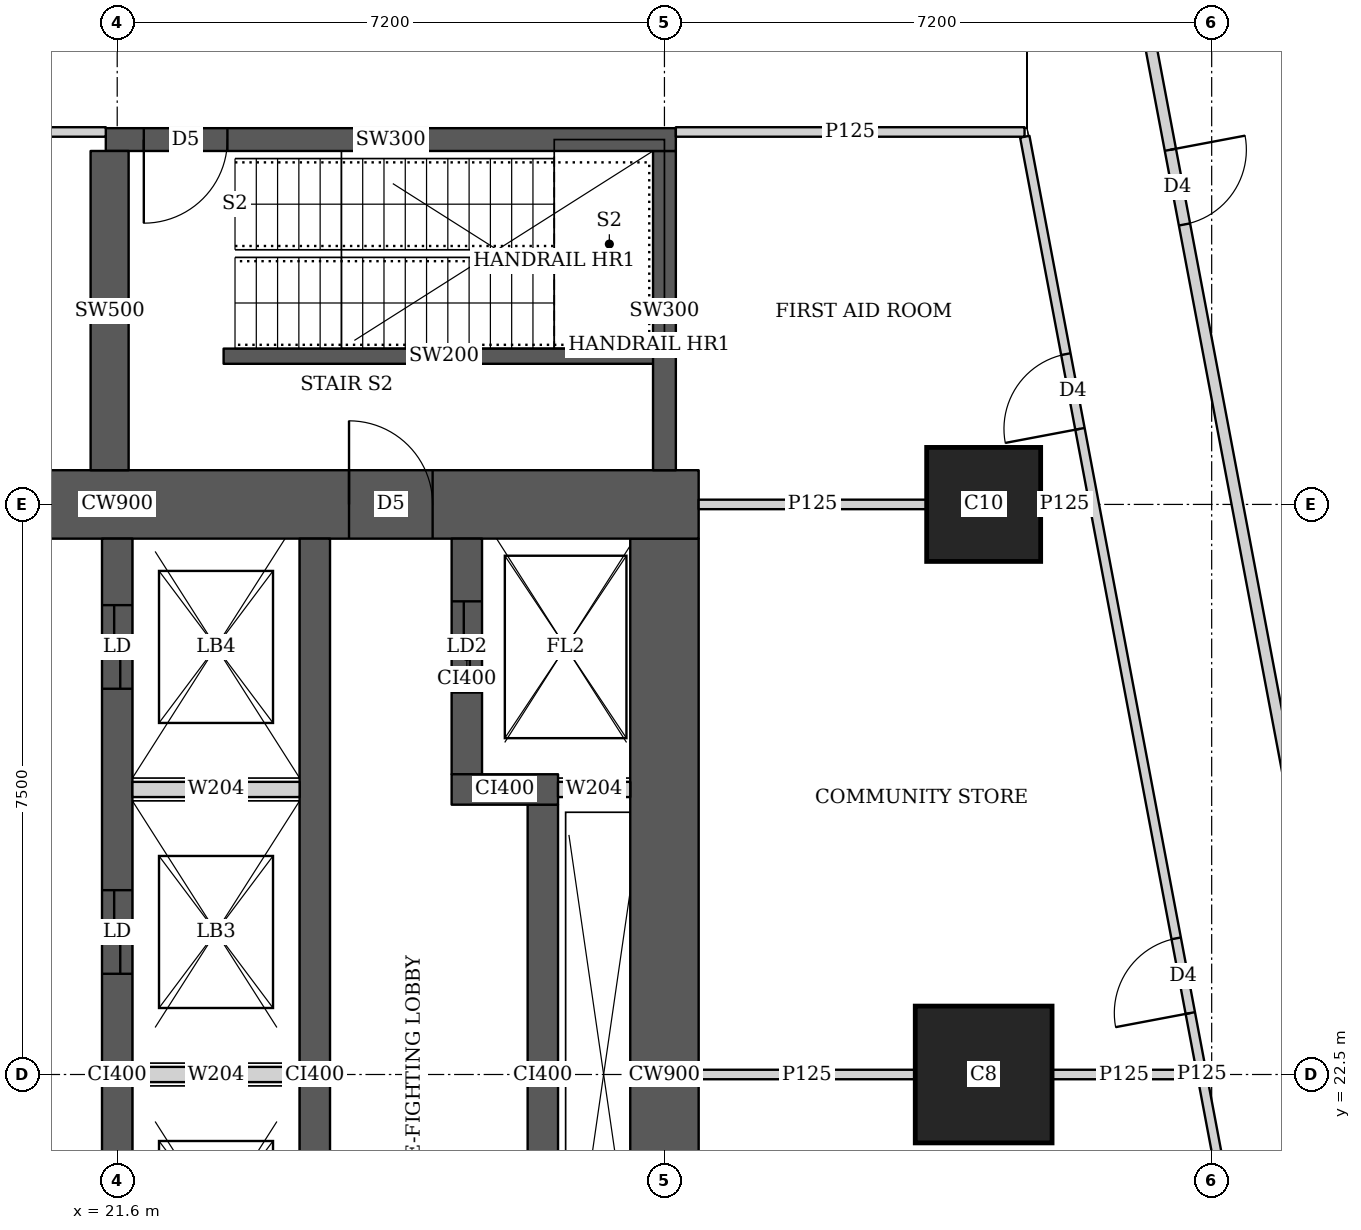
"""IFC4 building model, lengths in metres.
Left out: names, types, materials, properties, quantities, classifications, styles, units other than length and angle.
Written with IfcOpenShell. Run it as: python <this file> out.ifc"""

import sys

from ifc_helpers import new_model, si_unit, direction, frame, frame_2d, origin, origin_2d, place, context, subcontext, project, spatial, rectangle, extrude, element, fill, save


model = new_model("IFC4")
c1 = context("Model", 3, precision=1e-05, world=origin(), true_north=direction((0.0, 1.0)))
c2 = subcontext(c1, "Body", "Model", "MODEL_VIEW")
j1 = project(units=[si_unit("LENGTHUNIT", "METRE"), si_unit("PLANEANGLEUNIT", "RADIAN")], contexts=[c1])
p1 = place(None, origin())
s1 = spatial("IfcSite", under=j1, at=p1, CompositionType="ELEMENT")
p2 = place(p1, origin())
s2 = spatial("IfcBuilding", under=s1, at=p2, CompositionType="ELEMENT")
p3 = place(p2, frame((0.0, 0.0, 188.3)))
s3 = spatial("IfcBuildingStorey", under=s2, at=p3, CompositionType="ELEMENT", Elevation=188.3)
p4 = place(p3, frame((33.0, 22.5, 0.0), z_axis=(0.0, 0.0, 1.0), x_axis=(1.0, 0.0, 0.0)))
e1 = element("IfcColumn", 1, at=p4, inside=s3, PredefinedType="COLUMN", context=c2, shape_type="SweptSolid", body=[
    extrude(rectangle(XDim=1.8, YDim=1.8, at=origin_2d()), origin(), (0.0, 0.0, 1.0), 5.4),
])
p5 = place(p3, frame((33.0, 30.0, 0.0), z_axis=(0.0, 0.0, 1.0), x_axis=(1.0, 0.0, 0.0)))
e2 = element("IfcColumn", 2, at=p5, inside=s3, PredefinedType="COLUMN", context=c2, shape_type="SweptSolid", body=[
    extrude(rectangle(XDim=1.5, YDim=1.5, at=origin_2d()), origin(), (0.0, 0.0, 1.0), 5.4),
])
p6 = place(p3, frame((13.95, 30.0, 0.0), z_axis=(0.0, 0.0, 1.0), x_axis=(1.0, 0.0, 0.0)))
e3 = element("IfcWall", 3, at=p6, inside=s3, PredefinedType="SHEAR", context=c2, shape_type="SweptSolid", body=[
    extrude(rectangle(XDim=15.3, YDim=0.9, at=frame_2d((7.65, 0.0))), origin(), (0.0, 0.0, 1.0), 5.4),
])
p7 = place(p6, frame((4.45, 0.0, 0.0)))
e4 = element("IfcOpeningElement", 4, at=p7, cuts=e3, PredefinedType="OPENING", context=c2, shape_type="SweptSolid", body=[
    extrude(rectangle(XDim=1.8, YDim=2.1, at=frame_2d((0.9, 1.05))), frame((0.0, 0.46, 0.0), z_axis=(0.0, -1.0, 0.0), x_axis=(1.0, 0.0, 0.0)), (0.0, 0.0, 1.0), 0.92),
])
p8 = place(p6, frame((10.7, 0.0, 0.0)))
e5 = element("IfcOpeningElement", 5, at=p8, cuts=e3, PredefinedType="OPENING", context=c2, shape_type="SweptSolid", body=[
    extrude(rectangle(XDim=1.1, YDim=2.1, at=frame_2d((0.55, 1.05))), frame((0.0, 0.46, 0.0), z_axis=(0.0, -1.0, 0.0), x_axis=(1.0, 0.0, 0.0)), (0.0, 0.0, 1.0), 0.92),
])
p9 = place(p3, frame((28.8, 15.45, 0.0), z_axis=(0.0, 0.0, 1.0), x_axis=(0.0, 1.0, 0.0)))
e6 = element("IfcWall", 6, at=p9, inside=s3, PredefinedType="SHEAR", context=c2, shape_type="SweptSolid", body=[
    extrude(rectangle(XDim=14.1, YDim=0.9, at=frame_2d((7.05, 0.0))), origin(), (0.0, 0.0, 1.0), 5.4),
])
p10 = place(p3, frame((21.6, 15.45, 0.0), z_axis=(0.0, 0.0, 1.0), x_axis=(0.0, 1.0, 0.0)))
e7 = element("IfcWall", 7, at=p10, inside=s3, PredefinedType="SHEAR", context=c2, shape_type="SweptSolid", body=[
    extrude(rectangle(XDim=14.1, YDim=0.4, at=frame_2d((7.05, 0.0))), origin(), (0.0, 0.0, 1.0), 5.4),
])
p11 = place(p10, frame((0.875, 0.0, 0.0)))
e8 = element("IfcOpeningElement", 8, at=p11, cuts=e7, PredefinedType="OPENING", context=c2, shape_type="SweptSolid", body=[
    extrude(rectangle(XDim=1.1, YDim=2.1, at=frame_2d((0.55, 1.05))), frame((0.0, 0.21, 0.0), z_axis=(0.0, -1.0, 0.0), x_axis=(1.0, 0.0, 0.0)), (0.0, 0.0, 1.0), 0.42),
])
p12 = place(p10, frame((4.625, 0.0, 0.0)))
e9 = element("IfcOpeningElement", 9, at=p12, cuts=e7, PredefinedType="OPENING", context=c2, shape_type="SweptSolid", body=[
    extrude(rectangle(XDim=1.1, YDim=2.1, at=frame_2d((0.55, 1.05))), frame((0.0, 0.21, 0.0), z_axis=(0.0, -1.0, 0.0), x_axis=(1.0, 0.0, 0.0)), (0.0, 0.0, 1.0), 0.42),
])
p13 = place(p10, frame((8.375, 0.0, 0.0)))
e10 = element("IfcOpeningElement", 10, at=p13, cuts=e7, PredefinedType="OPENING", context=c2, shape_type="SweptSolid", body=[
    extrude(rectangle(XDim=1.1, YDim=2.1, at=frame_2d((0.55, 1.05))), frame((0.0, 0.21, 0.0), z_axis=(0.0, -1.0, 0.0), x_axis=(1.0, 0.0, 0.0)), (0.0, 0.0, 1.0), 0.42),
])
p14 = place(p10, frame((12.125, 0.0, 0.0)))
e11 = element("IfcOpeningElement", 11, at=p14, cuts=e7, PredefinedType="OPENING", context=c2, shape_type="SweptSolid", body=[
    extrude(rectangle(XDim=1.1, YDim=2.1, at=frame_2d((0.55, 1.05))), frame((0.0, 0.21, 0.0), z_axis=(0.0, -1.0, 0.0), x_axis=(1.0, 0.0, 0.0)), (0.0, 0.0, 1.0), 0.42),
])
p15 = place(p3, frame((24.2, 15.45, 0.0), z_axis=(0.0, 0.0, 1.0), x_axis=(0.0, 1.0, 0.0)))
e12 = element("IfcWall", 12, at=p15, inside=s3, PredefinedType="SHEAR", context=c2, shape_type="SweptSolid", body=[
    extrude(rectangle(XDim=14.1, YDim=0.4, at=frame_2d((7.05, 0.0))), origin(), (0.0, 0.0, 1.0), 5.4),
])
p16 = place(p3, frame((27.2, 18.95, 0.0), z_axis=(0.0, 0.0, 1.0), x_axis=(0.0, 1.0, 0.0)))
e13 = element("IfcWall", 13, at=p16, inside=s3, PredefinedType="SHEAR", context=c2, shape_type="SweptSolid", body=[
    extrude(rectangle(XDim=7.1, YDim=0.4, at=frame_2d((3.55, 0.0))), origin(), (0.0, 0.0, 1.0), 5.4),
])
p17 = place(p3, frame((26.0, 26.25, 0.0), z_axis=(0.0, 0.0, 1.0), x_axis=(1.0, 0.0, 0.0)))
e14 = element("IfcWall", 14, at=p17, inside=s3, PredefinedType="SHEAR", context=c2, shape_type="SweptSolid", body=[
    extrude(rectangle(XDim=1.4, YDim=0.4, at=frame_2d((0.7, 0.0))), origin(), (0.0, 0.0, 1.0), 5.4),
])
p18 = place(p3, frame((26.2, 26.45, 0.0), z_axis=(0.0, 0.0, 1.0), x_axis=(0.0, 1.0, 0.0)))
e15 = element("IfcWall", 15, at=p18, inside=s3, PredefinedType="SHEAR", context=c2, shape_type="SweptSolid", body=[
    extrude(rectangle(XDim=3.1, YDim=0.4, at=frame_2d((1.55, 0.0))), origin(), (0.0, 0.0, 1.0), 5.4),
])
p19 = place(p18, frame((1.075, 0.0, 0.0)))
e16 = element("IfcOpeningElement", 16, at=p19, cuts=e15, PredefinedType="OPENING", context=c2, shape_type="SweptSolid", body=[
    extrude(rectangle(XDim=1.2, YDim=2.1, at=frame_2d((0.6, 1.05))), frame((0.0, 0.21, 0.0), z_axis=(0.0, -1.0, 0.0), x_axis=(1.0, 0.0, 0.0)), (0.0, 0.0, 1.0), 0.42),
])
p20 = place(p3, frame((21.45, 34.8, 0.0), z_axis=(0.0, 0.0, 1.0), x_axis=(1.0, 0.0, 0.0)))
e17 = element("IfcWall", 17, at=p20, inside=s3, PredefinedType="SHEAR", context=c2, shape_type="SweptSolid", body=[
    extrude(rectangle(XDim=7.5, YDim=0.3, at=frame_2d((3.75, 0.0))), origin(), (0.0, 0.0, 1.0), 5.4),
])
p21 = place(p20, frame((0.5, 0.0, 0.0)))
e18 = element("IfcOpeningElement", 18, at=p21, cuts=e17, PredefinedType="OPENING", context=c2, shape_type="SweptSolid", body=[
    extrude(rectangle(XDim=1.1, YDim=2.1, at=frame_2d((0.55, 1.05))), frame((0.0, 0.16, 0.0), z_axis=(0.0, -1.0, 0.0), x_axis=(1.0, 0.0, 0.0)), (0.0, 0.0, 1.0), 0.32),
])
p22 = place(p3, frame((21.5, 30.45, 0.0), z_axis=(0.0, 0.0, 1.0), x_axis=(0.0, 1.0, 0.0)))
e19 = element("IfcWall", 19, at=p22, inside=s3, PredefinedType="SHEAR", context=c2, shape_type="SweptSolid", body=[
    extrude(rectangle(XDim=4.2, YDim=0.5, at=frame_2d((2.1, 0.0))), origin(), (0.0, 0.0, 1.0), 5.4),
])
p23 = place(p3, frame((28.8, 30.45, 0.0), z_axis=(0.0, 0.0, 1.0), x_axis=(0.0, 1.0, 0.0)))
e20 = element("IfcWall", 20, at=p23, inside=s3, PredefinedType="SHEAR", context=c2, shape_type="SweptSolid", body=[
    extrude(rectangle(XDim=4.2, YDim=0.3, at=frame_2d((2.1, 0.0))), origin(), (0.0, 0.0, 1.0), 5.4),
])
p24 = place(p3, frame((33.384, 45.638, 0.0), z_axis=(0.0, 0.0, 1.0), x_axis=(0.185609889355, -0.982623513342, 0.0)))
e21 = element("IfcWall", 21, at=p24, inside=s3, PredefinedType="SOLIDWALL", context=c2, shape_type="SweptSolid", body=[
    extrude(rectangle(XDim=47.093, YDim=0.15, at=frame_2d((23.547, 0.0))), origin(), (0.0, 0.0, 1.0), 3.35),
])
p25 = place(p24, frame((11.166, 0.0, 0.0)))
e22 = element("IfcOpeningElement", 22, at=p25, cuts=e21, PredefinedType="OPENING", context=c2, shape_type="SweptSolid", body=[
    extrude(rectangle(XDim=1.0, YDim=2.1, at=frame_2d((0.5, 1.05))), frame((0.0, 0.085, 0.0), z_axis=(0.0, -1.0, 0.0), x_axis=(1.0, 0.0, 0.0)), (0.0, 0.0, 1.0), 0.17),
])
p26 = place(p24, frame((26.737, 0.0, 0.0)))
e23 = element("IfcOpeningElement", 23, at=p26, cuts=e21, PredefinedType="OPENING", context=c2, shape_type="SweptSolid", body=[
    extrude(rectangle(XDim=2.0, YDim=2.1, at=frame_2d((1.0, 1.05))), frame((0.0, 0.085, 0.0), z_axis=(0.0, -1.0, 0.0), x_axis=(1.0, 0.0, 0.0)), (0.0, 0.0, 1.0), 0.17),
])
p27 = place(p24, frame((34.058, 0.0, 0.0)))
e24 = element("IfcOpeningElement", 24, at=p27, cuts=e21, PredefinedType="OPENING", context=c2, shape_type="SweptSolid", body=[
    extrude(rectangle(XDim=2.0, YDim=2.1, at=frame_2d((1.0, 1.05))), frame((0.0, 0.085, 0.0), z_axis=(0.0, -1.0, 0.0), x_axis=(1.0, 0.0, 0.0)), (0.0, 0.0, 1.0), 0.17),
])
p28 = place(p3, frame((10.163, 34.9, 0.0), z_axis=(0.0, 0.0, 1.0), x_axis=(1.0, 0.0, 0.0)))
e25 = element("IfcWall", 25, at=p28, inside=s3, PredefinedType="PARTITIONING", context=c2, shape_type="SweptSolid", body=[
    extrude(rectangle(XDim=11.287, YDim=0.125, at=frame_2d((5.644, 0.0))), origin(), (0.0, 0.0, 1.0), 3.15),
])
p29 = place(p28, frame((7.737, 0.0, 0.0)))
e26 = element("IfcOpeningElement", 26, at=p29, cuts=e25, PredefinedType="OPENING", context=c2, shape_type="SweptSolid", body=[
    extrude(rectangle(XDim=1.8, YDim=2.1, at=frame_2d((0.9, 1.05))), frame((0.0, 0.073, 0.0), z_axis=(0.0, -1.0, 0.0), x_axis=(1.0, 0.0, 0.0)), (0.0, 0.0, 1.0), 0.145),
])
p30 = place(p3, frame((28.95, 34.9, 0.0), z_axis=(0.0, 0.0, 1.0), x_axis=(1.0, 0.0, 0.0)))
e27 = element("IfcWall", 27, at=p30, inside=s3, PredefinedType="PARTITIONING", context=c2, shape_type="SweptSolid", body=[
    extrude(rectangle(XDim=4.588, YDim=0.125, at=frame_2d((2.294, 0.0))), origin(), (0.0, 0.0, 1.0), 3.15),
])
p31 = place(p3, frame((38.202, 10.163, 0.0), z_axis=(0.0, 0.0, 1.0), x_axis=(-0.185610321132, 0.982623431783, 0.0)))
e28 = element("IfcWall", 28, at=p31, inside=s3, PredefinedType="PARTITIONING", context=c2, shape_type="SweptSolid", body=[
    extrude(rectangle(XDim=25.111, YDim=0.125, at=frame_2d((12.556, 0.0))), origin(), (0.0, 0.0, 1.0), 3.55),
])
p32 = place(p31, frame((0.708, 0.0, 0.0)))
e29 = element("IfcOpeningElement", 29, at=p32, cuts=e28, PredefinedType="OPENING", context=c2, shape_type="SweptSolid", body=[
    extrude(rectangle(XDim=1.0, YDim=2.1, at=frame_2d((0.5, 1.05))), frame((0.0, 0.073, 0.0), z_axis=(0.0, -1.0, 0.0), x_axis=(1.0, 0.0, 0.0)), (0.0, 0.0, 1.0), 0.145),
])
p33 = place(p31, frame((5.95, 0.0, 0.0)))
e30 = element("IfcOpeningElement", 30, at=p33, cuts=e28, PredefinedType="OPENING", context=c2, shape_type="SweptSolid", body=[
    extrude(rectangle(XDim=1.0, YDim=2.1, at=frame_2d((0.5, 1.05))), frame((0.0, 0.073, 0.0), z_axis=(0.0, -1.0, 0.0), x_axis=(1.0, 0.0, 0.0)), (0.0, 0.0, 1.0), 0.145),
])
p34 = place(p31, frame((13.378, 0.0, 0.0)))
e31 = element("IfcOpeningElement", 31, at=p34, cuts=e28, PredefinedType="OPENING", context=c2, shape_type="SweptSolid", body=[
    extrude(rectangle(XDim=1.0, YDim=2.1, at=frame_2d((0.5, 1.05))), frame((0.0, 0.073, 0.0), z_axis=(0.0, -1.0, 0.0), x_axis=(1.0, 0.0, 0.0)), (0.0, 0.0, 1.0), 0.145),
])
p35 = place(p31, frame((21.2, 0.0, 0.0)))
e32 = element("IfcOpeningElement", 32, at=p35, cuts=e28, PredefinedType="OPENING", context=c2, shape_type="SweptSolid", body=[
    extrude(rectangle(XDim=1.0, YDim=2.1, at=frame_2d((0.5, 1.05))), frame((0.0, 0.073, 0.0), z_axis=(0.0, -1.0, 0.0), x_axis=(1.0, 0.0, 0.0)), (0.0, 0.0, 1.0), 0.145),
])
p36 = place(p3, frame((29.25, 22.5, 0.0), z_axis=(0.0, 0.0, 1.0), x_axis=(1.0, 0.0, 0.0)))
e33 = element("IfcWall", 33, at=p36, inside=s3, PredefinedType="PARTITIONING", context=c2, shape_type="SweptSolid", body=[
    extrude(rectangle(XDim=2.849, YDim=0.125, at=frame_2d((1.425, 0.0))), origin(), (0.0, 0.0, 1.0), 3.55),
])
p37 = place(p3, frame((33.901, 22.5, 0.0), z_axis=(0.0, 0.0, 1.0), x_axis=(1.0, 0.0, 0.0)))
e34 = element("IfcWall", 34, at=p37, inside=s3, PredefinedType="PARTITIONING", context=c2, shape_type="SweptSolid", body=[
    extrude(rectangle(XDim=1.895, YDim=0.125, at=frame_2d((0.948, 0.0))), origin(), (0.0, 0.0, 1.0), 3.55),
])
p38 = place(p3, frame((29.25, 30.0, 0.0), z_axis=(0.0, 0.0, 1.0), x_axis=(1.0, 0.0, 0.0)))
e35 = element("IfcWall", 35, at=p38, inside=s3, PredefinedType="PARTITIONING", context=c2, shape_type="SweptSolid", body=[
    extrude(rectangle(XDim=2.999, YDim=0.125, at=frame_2d((1.5, 0.0))), origin(), (0.0, 0.0, 1.0), 3.55),
])
p39 = place(p3, frame((33.751, 30.0, 0.0), z_axis=(0.0, 0.0, 1.0), x_axis=(1.0, 0.0, 0.0)))
e36 = element("IfcWall", 36, at=p39, inside=s3, PredefinedType="PARTITIONING", context=c2, shape_type="SweptSolid", body=[
    extrude(rectangle(XDim=0.628, YDim=0.125, at=frame_2d((0.314, 0.0))), origin(), (0.0, 0.0, 1.0), 3.55),
])
p40 = place(p3, frame((23.0, 31.95, 0.0), z_axis=(0.0, 0.0, 1.0), x_axis=(1.0, 0.0, 0.0)))
e37 = element("IfcWall", 37, at=p40, inside=s3, PredefinedType="SHEAR", context=c2, shape_type="SweptSolid", body=[
    extrude(rectangle(XDim=5.8, YDim=0.2, at=frame_2d((2.9, 0.0))), origin(), (0.0, 0.0, 1.0), 5.4),
])
for number, where, z_axis, x_axis in (
    (38, (21.8, 22.5, 0.0), (0.0, 0.0, 1.0), (1.0, 0.0, 0.0)),
    (39, (21.8, 26.25, 0.0), (0.0, 0.0, 1.0), (1.0, 0.0, 0.0)),
):
    element("IfcWall", number, at=place(p3, frame(where, z_axis=z_axis, x_axis=x_axis)), inside=s3, PredefinedType="SOLIDWALL", context=c2, shape_type="SweptSolid", body=[
        extrude(rectangle(XDim=2.2, YDim=0.2, at=frame_2d((1.1, 0.0))), origin(), (0.0, 0.0, 1.0), 5.15),
    ])
p41 = place(p3, frame((27.4, 26.25, 0.0), z_axis=(0.0, 0.0, 1.0), x_axis=(1.0, 0.0, 0.0)))
e40 = element("IfcWall", 40, at=p41, inside=s3, PredefinedType="SOLIDWALL", context=c2, shape_type="SweptSolid", body=[
    extrude(rectangle(XDim=0.95, YDim=0.2, at=frame_2d((0.475, 0.0))), origin(), (0.0, 0.0, 1.0), 5.15),
])
p42 = place(p25, origin())
e41 = element("IfcDoor", 41, at=p42, inside=s3, OperationType="SINGLE_SWING_LEFT", PredefinedType="DOOR", context=c2, shape_type="SweptSolid", body=[
    extrude(rectangle(XDim=1.0, YDim=2.1, at=frame_2d((0.5, 1.05))), frame((0.0, 0.025, 0.0), z_axis=(0.0, -1.0, 0.0), x_axis=(1.0, 0.0, 0.0)), (0.0, 0.0, 1.0), 0.05),
])
fill(e22, e41)
p43 = place(p34, origin())
e42 = element("IfcDoor", 42, at=p43, inside=s3, OperationType="SINGLE_SWING_LEFT", PredefinedType="DOOR", context=c2, shape_type="SweptSolid", body=[
    extrude(rectangle(XDim=1.0, YDim=2.1, at=frame_2d((0.5, 1.05))), frame((0.0, 0.025, 0.0), z_axis=(0.0, -1.0, 0.0), x_axis=(1.0, 0.0, 0.0)), (0.0, 0.0, 1.0), 0.05),
])
fill(e31, e42)
p44 = place(p35, origin())
e43 = element("IfcDoor", 43, at=p44, inside=s3, OperationType="SINGLE_SWING_LEFT", PredefinedType="DOOR", context=c2, shape_type="SweptSolid", body=[
    extrude(rectangle(XDim=1.0, YDim=2.1, at=frame_2d((0.5, 1.05))), frame((0.0, 0.025, 0.0), z_axis=(0.0, -1.0, 0.0), x_axis=(1.0, 0.0, 0.0)), (0.0, 0.0, 1.0), 0.05),
])
fill(e32, e43)
p45 = place(p8, origin())
e44 = element("IfcDoor", 44, at=p45, inside=s3, OperationType="SINGLE_SWING_LEFT", PredefinedType="DOOR", context=c2, shape_type="SweptSolid", body=[
    extrude(rectangle(XDim=1.1, YDim=2.1, at=frame_2d((0.55, 1.05))), frame((0.0, 0.025, 0.0), z_axis=(0.0, -1.0, 0.0), x_axis=(1.0, 0.0, 0.0)), (0.0, 0.0, 1.0), 0.05),
])
fill(e5, e44)
p46 = place(p19, origin())
e45 = element("IfcDoor", 45, at=p46, inside=s3, OperationType="DOUBLE_DOOR_SLIDING", PredefinedType="DOOR", context=c2, shape_type="SweptSolid", body=[
    extrude(rectangle(XDim=1.2, YDim=2.1, at=frame_2d((0.6, 1.05))), frame((0.0, 0.025, 0.0), z_axis=(0.0, -1.0, 0.0), x_axis=(1.0, 0.0, 0.0)), (0.0, 0.0, 1.0), 0.05),
])
fill(e16, e45)
p47 = place(p13, origin())
e46 = element("IfcDoor", 46, at=p47, inside=s3, OperationType="DOUBLE_DOOR_SLIDING", PredefinedType="DOOR", context=c2, shape_type="SweptSolid", body=[
    extrude(rectangle(XDim=1.1, YDim=2.1, at=frame_2d((0.55, 1.05))), frame((0.0, 0.025, 0.0), z_axis=(0.0, -1.0, 0.0), x_axis=(1.0, 0.0, 0.0)), (0.0, 0.0, 1.0), 0.05),
])
fill(e10, e46)
p48 = place(p14, origin())
e47 = element("IfcDoor", 47, at=p48, inside=s3, OperationType="DOUBLE_DOOR_SLIDING", PredefinedType="DOOR", context=c2, shape_type="SweptSolid", body=[
    extrude(rectangle(XDim=1.1, YDim=2.1, at=frame_2d((0.55, 1.05))), frame((0.0, 0.025, 0.0), z_axis=(0.0, -1.0, 0.0), x_axis=(1.0, 0.0, 0.0)), (0.0, 0.0, 1.0), 0.05),
])
fill(e11, e47)
p49 = place(p21, origin())
e48 = element("IfcDoor", 48, at=p49, inside=s3, OperationType="SINGLE_SWING_RIGHT", PredefinedType="DOOR", context=c2, shape_type="SweptSolid", body=[
    extrude(rectangle(XDim=1.1, YDim=2.1, at=frame_2d((0.55, 1.05))), frame((0.0, 0.025, 0.0), z_axis=(0.0, -1.0, 0.0), x_axis=(1.0, 0.0, 0.0)), (0.0, 0.0, 1.0), 0.05),
])
fill(e18, e48)
save(model, sys.argv[1])
